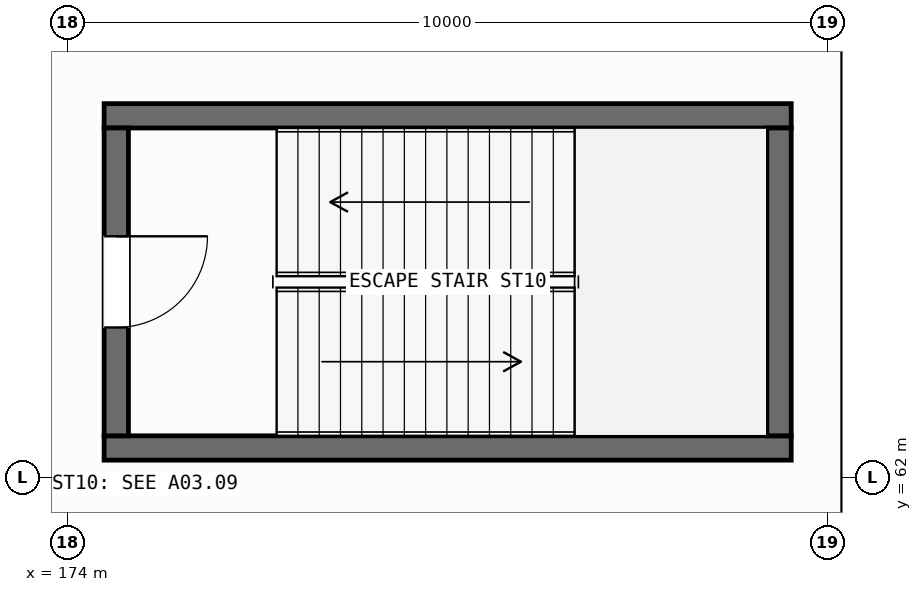
"""IFC4 building model, lengths in metres.
Left out: names, types, materials, properties, quantities, classifications, styles, units other than length and angle.
Written with IfcOpenShell. Run it as: python <this file> out.ifc"""

import sys

from ifc_helpers import new_model, si_unit, direction, frame, frame_2d, origin, place, context, subcontext, project, spatial, rectangle, extrude, element, fill, save


model = new_model("IFC4")
c1 = context("Model", 3, precision=1e-05, world=origin(), true_north=direction((0.0, 1.0)))
c2 = subcontext(c1, "Body", "Model", "MODEL_VIEW")
j1 = project(units=[si_unit("LENGTHUNIT", "METRE"), si_unit("PLANEANGLEUNIT", "RADIAN")], contexts=[c1])
p1 = place(None, origin())
s1 = spatial("IfcSite", under=j1, at=p1, CompositionType="ELEMENT")
p2 = place(p1, origin())
s2 = spatial("IfcBuilding", under=s1, at=p2, CompositionType="ELEMENT")
p3 = place(p2, frame((0.0, 0.0, -5.4)))
s3 = spatial("IfcBuildingStorey", under=s2, at=p3, CompositionType="ELEMENT", Elevation=-5.4)
for number, where, z_axis, x_axis in (
    (1, (174.48, 62.39, 0.0), (0.0, 0.0, 1.0), (1.0, 0.0, 0.0)),
    (2, (174.48, 66.76, 0.0), (0.0, 0.0, 1.0), (1.0, 0.0, 0.0)),
):
    element("IfcWall", number, at=place(p3, frame(where, z_axis=z_axis, x_axis=x_axis)), inside=s3, PredefinedType="SHEAR", context=c2, shape_type="SweptSolid", body=[
        extrude(rectangle(XDim=9.04, YDim=0.32, at=frame_2d((4.52, 0.0))), origin(), (0.0, 0.0, 1.0), 5.4),
    ])
p4 = place(p3, frame((174.64, 62.55, 0.0), z_axis=(0.0, 0.0, 1.0), x_axis=(0.0, 1.0, 0.0)))
e3 = element("IfcWall", 3, at=p4, inside=s3, PredefinedType="SHEAR", context=c2, shape_type="SweptSolid", body=[
    extrude(rectangle(XDim=4.05, YDim=0.32, at=frame_2d((2.025, 0.0))), origin(), (0.0, 0.0, 1.0), 5.4),
])
p5 = place(p4, frame((1.425, 0.0, 0.0)))
e4 = element("IfcOpeningElement", 4, at=p5, cuts=e3, PredefinedType="OPENING", context=c2, shape_type="SweptSolid", body=[
    extrude(rectangle(XDim=1.2, YDim=2.2, at=frame_2d((0.6, 1.1))), frame((0.0, 0.17, 0.0), z_axis=(0.0, -1.0, 0.0), x_axis=(1.0, 0.0, 0.0)), (0.0, 0.0, 1.0), 0.34),
])
p6 = place(p3, frame((183.36, 62.55, 0.0), z_axis=(0.0, 0.0, 1.0), x_axis=(0.0, 1.0, 0.0)))
e5 = element("IfcWall", 5, at=p6, inside=s3, PredefinedType="SHEAR", context=c2, shape_type="SweptSolid", body=[
    extrude(rectangle(XDim=4.05, YDim=0.32, at=frame_2d((2.025, 0.0))), origin(), (0.0, 0.0, 1.0), 5.4),
])
p7 = place(p5, frame((1.2, 0.0, 0.0), z_axis=(0.0, 0.0, 1.0), x_axis=(-1.0, 0.0, 0.0)))
e6 = element("IfcDoor", 6, at=p7, inside=s3, OperationType="SINGLE_SWING_LEFT", PredefinedType="DOOR", context=c2, shape_type="SweptSolid", body=[
    extrude(rectangle(XDim=1.2, YDim=2.2, at=frame_2d((0.6, 1.1))), frame((0.0, 0.025, 0.0), z_axis=(0.0, -1.0, 0.0), x_axis=(1.0, 0.0, 0.0)), (0.0, 0.0, 1.0), 0.05),
])
fill(e4, e6)
save(model, sys.argv[1])
